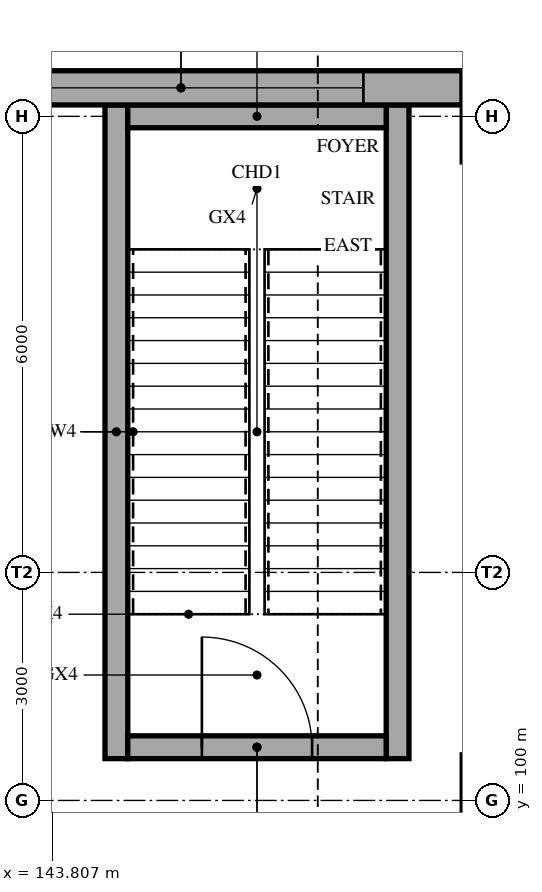
"""IFC4 building model, lengths in metres.
Left out: names, types, materials, properties, quantities, classifications, styles, units other than length and angle.
Written with IfcOpenShell. Run it as: python <this file> out.ifc"""

import sys

from ifc_helpers import new_model, si_unit, direction, frame, frame_2d, origin, place, context, subcontext, project, spatial, rectangle, extrude, element, fill, save


model = new_model("IFC4")
c1 = context("Model", 3, precision=1e-05, world=origin(), true_north=direction((0.0, 1.0)))
c2 = subcontext(c1, "Body", "Model", "MODEL_VIEW")
j1 = project(units=[si_unit("LENGTHUNIT", "METRE"), si_unit("PLANEANGLEUNIT", "RADIAN")], contexts=[c1])
p1 = place(None, origin())
s1 = spatial("IfcSite", under=j1, at=p1, CompositionType="ELEMENT")
p2 = place(p1, origin())
s2 = spatial("IfcBuilding", under=s1, at=p2, CompositionType="ELEMENT")
p3 = place(p2, origin())
s3 = spatial("IfcBuildingStorey", under=s2, at=p3, CompositionType="ELEMENT", Elevation=0.0)
for number, where, z_axis, x_axis in (
    (1, (144.65, 100.55, 0.0), (0.0, 0.0, 1.0), (0.0, 1.0, 0.0)),
    (2, (148.35, 100.55, 0.0), (0.0, 0.0, 1.0), (0.0, 1.0, 0.0)),
):
    element("IfcWall", number, at=place(p3, frame(where, z_axis=z_axis, x_axis=x_axis)), inside=s3, PredefinedType="SHEAR", context=c2, shape_type="SweptSolid", body=[
        extrude(rectangle(XDim=8.6, YDim=0.3, at=frame_2d((4.3, 0.0))), origin(), (0.0, 0.0, 1.0), 5.0),
    ])
p4 = place(p3, frame((144.8, 100.7, 0.0), z_axis=(0.0, 0.0, 1.0), x_axis=(1.0, 0.0, 0.0)))
e3 = element("IfcWall", 3, at=p4, inside=s3, PredefinedType="SHEAR", context=c2, shape_type="SweptSolid", body=[
    extrude(rectangle(XDim=3.4, YDim=0.3, at=frame_2d((1.7, 0.0))), origin(), (0.0, 0.0, 1.0), 5.0),
])
p5 = place(p4, frame((0.975, 0.0, 0.0)))
e4 = element("IfcOpeningElement", 4, at=p5, cuts=e3, PredefinedType="OPENING", context=c2, shape_type="SweptSolid", body=[
    extrude(rectangle(XDim=1.45, YDim=2.1, at=frame_2d((0.725, 1.05))), frame((0.0, 0.16, 0.0), z_axis=(0.0, -1.0, 0.0), x_axis=(1.0, 0.0, 0.0)), (0.0, 0.0, 1.0), 0.32),
])
p6 = place(p3, frame((144.8, 109.0, 0.0), z_axis=(0.0, 0.0, 1.0), x_axis=(1.0, 0.0, 0.0)))
e5 = element("IfcWall", 5, at=p6, inside=s3, PredefinedType="SHEAR", context=c2, shape_type="SweptSolid", body=[
    extrude(rectangle(XDim=3.4, YDim=0.3, at=frame_2d((1.7, 0.0))), origin(), (0.0, 0.0, 1.0), 5.0),
])
p7 = place(p3, frame((141.8, 109.375, 0.0), z_axis=(0.0, 0.0, 1.0), x_axis=(1.0, 0.0, 0.0)))
e6 = element("IfcWall", 6, at=p7, inside=s3, PredefinedType="SOLIDWALL", context=c2, shape_type="SweptSolid", body=[
    extrude(rectangle(XDim=7.4, YDim=0.45, at=frame_2d((3.7, 0.0))), origin(), (0.0, 0.0, 1.0), 5.0),
])
p8 = place(p7, frame((1.3, 0.0, 0.9)))
e7 = element("IfcOpeningElement", 7, at=p8, cuts=e6, PredefinedType="OPENING", context=c2, shape_type="SweptSolid", body=[
    extrude(rectangle(XDim=4.8, YDim=3.0, at=frame_2d((2.4, 1.5))), frame((0.0, 0.235, 0.0), z_axis=(0.0, -1.0, 0.0), x_axis=(1.0, 0.0, 0.0)), (0.0, 0.0, 1.0), 0.47),
])
p9 = place(p8, origin())
e8 = element("IfcWindow", 8, at=p9, inside=s3, PartitioningType="SINGLE_PANEL", PredefinedType="WINDOW", context=c2, shape_type="SweptSolid", body=[
    extrude(rectangle(XDim=4.8, YDim=3.0, at=frame_2d((2.4, 1.5))), frame((0.0, 0.03, 0.0), z_axis=(0.0, -1.0, 0.0), x_axis=(1.0, 0.0, 0.0)), (0.0, 0.0, 1.0), 0.06),
])
fill(e7, e8)
p10 = place(p5, origin())
e9 = element("IfcDoor", 9, at=p10, inside=s3, OperationType="SINGLE_SWING_LEFT", PredefinedType="DOOR", context=c2, shape_type="SweptSolid", body=[
    extrude(rectangle(XDim=1.45, YDim=2.1, at=frame_2d((0.725, 1.05))), frame((0.0, 0.025, 0.0), z_axis=(0.0, -1.0, 0.0), x_axis=(1.0, 0.0, 0.0)), (0.0, 0.0, 1.0), 0.05),
])
fill(e4, e9)
save(model, sys.argv[1])
